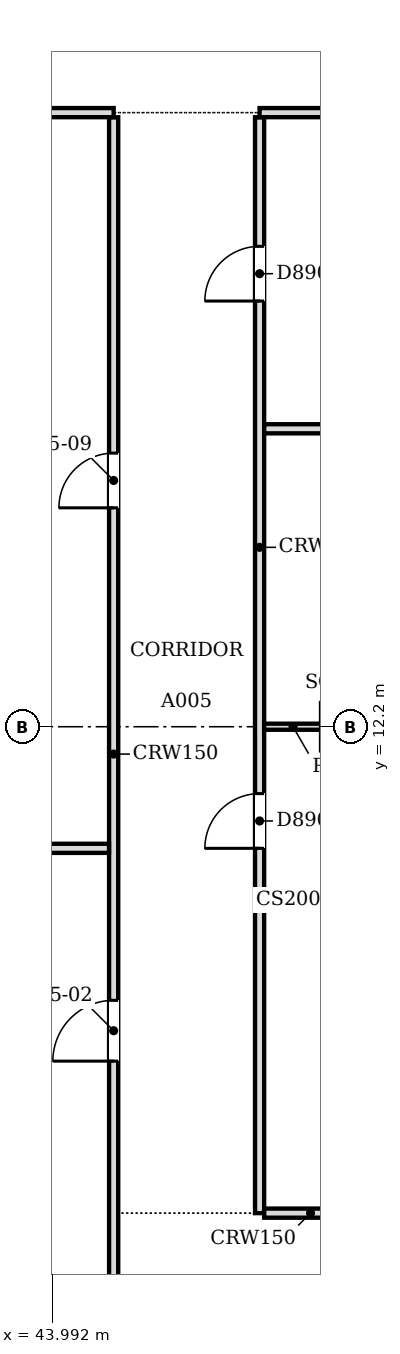
"""IFC4 building model, lengths in metres.
Left out: names, types, materials, properties, quantities, classifications, styles, units other than length and angle.
Written with IfcOpenShell. Run it as: python <this file> out.ifc"""

import sys

from ifc_helpers import new_model, si_unit, direction, frame, frame_2d, origin, place, context, subcontext, project, spatial, rectangle, extrude, source, transform, mapped, element, fill, save


model = new_model("IFC4")
c1 = context("Model", 3, precision=1e-05, world=origin(), true_north=direction((0.0, 1.0)))
c2 = subcontext(c1, "Body", "Model", "MODEL_VIEW")
j1 = project(units=[si_unit("LENGTHUNIT", "METRE"), si_unit("PLANEANGLEUNIT", "RADIAN")], contexts=[c1])
p1 = place(None, origin())
s1 = spatial("IfcSite", under=j1, at=p1, CompositionType="ELEMENT")
p2 = place(p1, origin())
s2 = spatial("IfcBuilding", under=s1, at=p2, CompositionType="ELEMENT")
p3 = place(p2, frame((0.0, 0.0, 170.6)))
s3 = spatial("IfcBuildingStorey", under=s2, at=p3, CompositionType="ELEMENT", Elevation=170.6)
p4 = place(p3, frame((45.0, 0.5, 0.0), z_axis=(0.0, 0.0, 1.0), x_axis=(0.0, 1.0, 0.0)))
e1 = element("IfcWall", 1, at=p4, inside=s3, PredefinedType="PARTITIONING", context=c2, shape_type="SweptSolid", body=[
    extrude(rectangle(XDim=21.724, YDim=0.15, at=frame_2d((10.862, 0.0))), origin(), (0.0, 0.0, 1.0), 3.067),
])
m1 = source(origin(), c2, "Body", "SweptSolid", [
    extrude(rectangle(XDim=1.0, YDim=2.1, at=frame_2d((0.5, 1.05))), frame((0.0, 0.085, 0.0), z_axis=(0.0, -1.0, 0.0), x_axis=(1.0, 0.0, 0.0)), (0.0, 0.0, 1.0), 0.17),
])
p5 = place(p4, frame((6.2, 0.0, 0.0)))
e2 = element("IfcOpeningElement", 2, at=p5, cuts=e1, PredefinedType="OPENING", context=c2, shape_type="MappedRepresentation", body=[
    mapped(m1, transform((0.0, 0.0, 0.0), scale=1.0)),
])
m2 = source(origin(), c2, "Body", "SweptSolid", [
    extrude(rectangle(XDim=0.9, YDim=2.1, at=frame_2d((0.45, 1.05))), frame((0.0, 0.085, 0.0), z_axis=(0.0, -1.0, 0.0), x_axis=(1.0, 0.0, 0.0)), (0.0, 0.0, 1.0), 0.17),
])
p6 = place(p4, frame((15.3, 0.0, 0.0)))
e3 = element("IfcOpeningElement", 3, at=p6, cuts=e1, PredefinedType="OPENING", context=c2, shape_type="MappedRepresentation", body=[
    mapped(m2, transform((0.0, 0.0, 0.0), scale=1.0)),
])
p7 = place(p3, frame((47.4, 22.224, 0.0), z_axis=(0.0, 0.0, 1.0), x_axis=(0.0, -1.0, 0.0)))
e4 = element("IfcWall", 4, at=p7, inside=s3, PredefinedType="PARTITIONING", context=c2, shape_type="SweptSolid", body=[
    extrude(rectangle(XDim=18.024, YDim=0.15, at=frame_2d((9.012, 0.0))), origin(), (0.0, 0.0, 1.0), 3.067),
])
p8 = place(p7, frame((2.123, 0.0, 0.0)))
e5 = element("IfcOpeningElement", 5, at=p8, cuts=e4, PredefinedType="OPENING", context=c2, shape_type="MappedRepresentation", body=[
    mapped(m2, transform((0.0, 0.0, 0.0), scale=1.0)),
])
p9 = place(p7, frame((11.124, 0.0, 0.0)))
e6 = element("IfcOpeningElement", 6, at=p9, cuts=e4, PredefinedType="OPENING", context=c2, shape_type="MappedRepresentation", body=[
    mapped(m2, transform((0.0, 0.0, 0.0), scale=1.0)),
])
p10 = place(p3, frame((47.476, 4.2, 0.0), z_axis=(0.0, 0.0, 1.0), x_axis=(1.0, 0.0, 0.0)))
e7 = element("IfcWall", 7, at=p10, inside=s3, PredefinedType="PARTITIONING", context=c2, shape_type="SweptSolid", body=[
    extrude(rectangle(XDim=1.524, YDim=0.15, at=frame_2d((0.762, 0.0))), origin(), (0.0, 0.0, 1.0), 3.067),
])
p11 = place(p3, frame((27.5, 10.2, 0.0), z_axis=(0.0, 0.0, 1.0), x_axis=(1.0, 0.0, 0.0)))
e8 = element("IfcWall", 8, at=p11, inside=s3, PredefinedType="PARTITIONING", context=c2, shape_type="SweptSolid", body=[
    extrude(rectangle(XDim=17.424, YDim=0.15, at=frame_2d((8.712, 0.0))), origin(), (0.0, 0.0, 1.0), 3.067),
])
p12 = place(p3, frame((48.425, 12.2, 0.0), z_axis=(0.0, 0.0, 1.0), x_axis=(-1.0, 0.0, 0.0)))
e9 = element("IfcWall", 9, at=p12, inside=s3, PredefinedType="PARTITIONING", context=c2, shape_type="SweptSolid", body=[
    extrude(rectangle(XDim=0.95, YDim=0.1, at=frame_2d((0.475, 0.0))), origin(), (0.0, 0.0, 1.0), 3.067),
])
p13 = place(p3, frame((47.476, 17.1, 0.0), z_axis=(0.0, 0.0, 1.0), x_axis=(1.0, 0.0, 0.0)))
e10 = element("IfcWall", 10, at=p13, inside=s3, PredefinedType="PARTITIONING", context=c2, shape_type="SweptSolid", body=[
    extrude(rectangle(XDim=13.024, YDim=0.15, at=frame_2d((6.512, 0.0))), origin(), (0.0, 0.0, 1.0), 3.067),
])
p14 = place(p3, frame((30.5, 22.3, 0.0), z_axis=(0.0, 0.0, 1.0), x_axis=(1.0, 0.0, 0.0)))
e11 = element("IfcWall", 11, at=p14, inside=s3, PredefinedType="PARTITIONING", context=c2, shape_type="SweptSolid", body=[
    extrude(rectangle(XDim=14.5, YDim=0.15, at=frame_2d((7.25, 0.0))), origin(), (0.0, 0.0, 1.0), 3.067),
])
p15 = place(p3, frame((47.4, 22.3, 0.0), z_axis=(0.0, 0.0, 1.0), x_axis=(1.0, 0.0, 0.0)))
e12 = element("IfcWall", 12, at=p15, inside=s3, PredefinedType="PARTITIONING", context=c2, shape_type="SweptSolid", body=[
    extrude(rectangle(XDim=9.524, YDim=0.15, at=frame_2d((4.762, 0.0))), origin(), (0.0, 0.0, 1.0), 3.067),
])
m3 = source(origin(), c2, "Body", "SweptSolid", [
    extrude(rectangle(XDim=0.9, YDim=2.1, at=frame_2d((0.45, 1.05))), frame((0.0, 0.025, 0.0), z_axis=(0.0, -1.0, 0.0), x_axis=(1.0, 0.0, 0.0)), (0.0, 0.0, 1.0), 0.05),
])
p16 = place(p8, origin())
e13 = element("IfcDoor", 13, at=p16, inside=s3, OperationType="SINGLE_SWING_RIGHT", PredefinedType="DOOR", context=c2, shape_type="MappedRepresentation", body=[
    mapped(m3, transform((0.0, 0.0, 0.0), scale=1.0)),
])
fill(e5, e13)
m4 = source(origin(), c2, "Body", "SweptSolid", [
    extrude(rectangle(XDim=1.0, YDim=2.1, at=frame_2d((0.5, 1.05))), frame((0.0, 0.025, 0.0), z_axis=(0.0, -1.0, 0.0), x_axis=(1.0, 0.0, 0.0)), (0.0, 0.0, 1.0), 0.05),
])
p17 = place(p5, origin())
e14 = element("IfcDoor", 14, at=p17, inside=s3, OperationType="SINGLE_SWING_LEFT", PredefinedType="DOOR", context=c2, shape_type="MappedRepresentation", body=[
    mapped(m4, transform((0.0, 0.0, 0.0), scale=1.0)),
])
fill(e2, e14)
p18 = place(p6, origin())
e15 = element("IfcDoor", 15, at=p18, inside=s3, OperationType="SINGLE_SWING_LEFT", PredefinedType="DOOR", context=c2, shape_type="MappedRepresentation", body=[
    mapped(m3, transform((0.0, 0.0, 0.0), scale=1.0)),
])
fill(e3, e15)
p19 = place(p9, origin())
e16 = element("IfcDoor", 16, at=p19, inside=s3, OperationType="SINGLE_SWING_RIGHT", PredefinedType="DOOR", context=c2, shape_type="MappedRepresentation", body=[
    mapped(m3, transform((0.0, 0.0, 0.0), scale=1.0)),
])
fill(e6, e16)
save(model, sys.argv[1])
